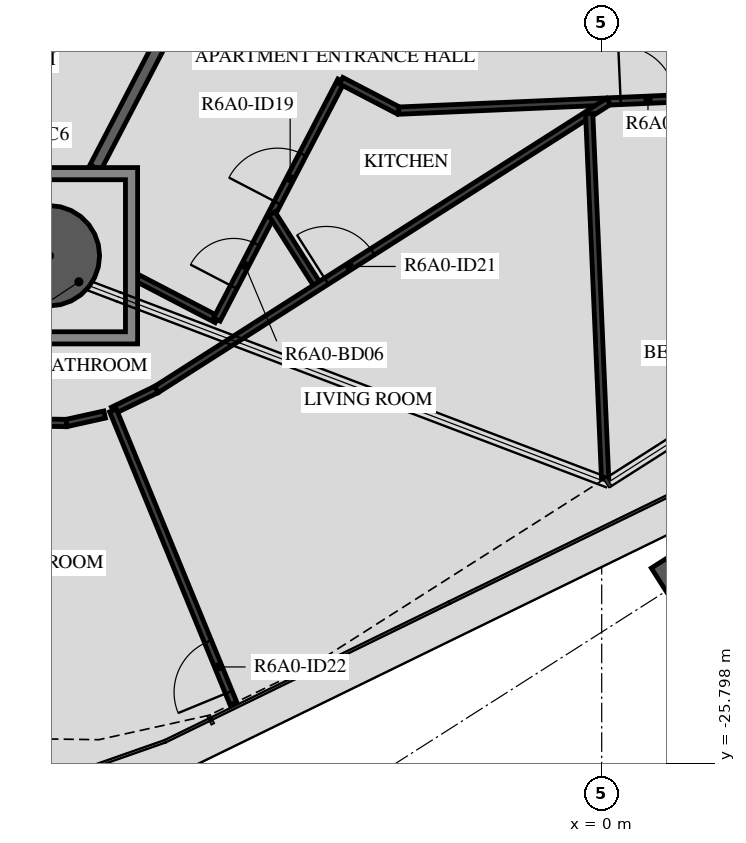
"""IFC4 building model, lengths in metres.
Left out: names, types, materials, properties, quantities, classifications, styles, units other than length and angle.
Written with IfcOpenShell. Run it as: python <this file> out.ifc"""

import sys

from ifc_helpers import new_model, si_unit, direction, frame, frame_2d, origin, origin_2d, place, context, subcontext, project, spatial, polyline, rectangle, hollow_circle, i_section, outline, extrude, element, fill, save


model = new_model("IFC4")
c1 = context("Model", 3, precision=1e-05, world=origin(), true_north=direction((0.0, 1.0)))
c2 = subcontext(c1, "Body", "Model", "MODEL_VIEW")
j1 = project(units=[si_unit("LENGTHUNIT", "METRE"), si_unit("PLANEANGLEUNIT", "RADIAN")], contexts=[c1])
p1 = place(None, origin())
s1 = spatial("IfcSite", under=j1, at=p1, CompositionType="ELEMENT")
p2 = place(p1, origin())
s2 = spatial("IfcBuilding", under=s1, at=p2, CompositionType="ELEMENT")
p3 = place(p2, frame((0.0, 0.0, 226.7)))
s3 = spatial("IfcBuildingStorey", under=s2, at=p3, CompositionType="ELEMENT", Elevation=226.7)
p4 = place(p3, frame((-9.082, -17.446, -0.45), z_axis=(0.0, 0.0, 1.0), x_axis=(1.0, 0.0, 0.0)))
e1 = element("IfcColumn", 1, at=p4, inside=s3, PredefinedType="COLUMN", context=c2, shape_type="SweptSolid", body=[
    extrude(hollow_circle(Radius=0.825, WallThickness=0.04, at=origin_2d()), origin(), (0.0, 0.0, 1.0), 3.57),
])
p5 = place(p3, frame((1.185, -22.881, -0.45), z_axis=(0.0, 0.0, 1.0), x_axis=(-0.843391139633, -0.537300088953, 0.0)))
e2 = element("IfcColumn", 2, at=p5, inside=s3, PredefinedType="COLUMN", context=c2, shape_type="SweptSolid", body=[
    extrude(i_section(OverallWidth=0.3, OverallDepth=0.9, WebThickness=0.019, FlangeThickness=0.035, FilletRadius=0.03, at=origin_2d()), origin(), (0.0, 0.0, 1.0), 3.57),
])
p6 = place(p3, frame((-8.326, -15.996, 0.0), z_axis=(0.0, 0.0, 1.0), x_axis=(0.461739255077, 0.887015704664, 0.0)))
e3 = element("IfcWall", 3, at=p6, inside=s3, PredefinedType="STANDARD", context=c2, shape_type="SweptSolid", body=[
    extrude(rectangle(XDim=4.633, YDim=0.2, at=frame_2d((2.317, 0.0))), origin(), (0.0, 0.0, 1.0), 3.12),
])
p7 = place(p3, frame((-7.632, -17.815, 0.0), z_axis=(0.0, 0.0, 1.0), x_axis=(0.886960889958, -0.461844540602, 0.0)))
e4 = element("IfcWall", 4, at=p7, inside=s3, PredefinedType="PARTITIONING", context=c2, shape_type="SweptSolid", body=[
    extrude(rectangle(XDim=1.469, YDim=0.12, at=frame_2d((0.734, 0.0))), origin(), (0.0, 0.0, 1.0), 3.12),
])
p8 = place(p3, frame((-6.329, -18.494, 0.0), z_axis=(0.0, 0.0, 1.0), x_axis=(0.461759058182, 0.887005395805, 0.0)))
e5 = element("IfcWall", 5, at=p8, inside=s3, PredefinedType="PARTITIONING", context=c2, shape_type="SweptSolid", body=[
    extrude(rectangle(XDim=4.427, YDim=0.12, at=frame_2d((2.213, 0.0))), origin(), (0.0, 0.0, 1.0), 3.12),
])
p9 = place(p8, frame((0.6, 0.0, 0.0)))
e6 = element("IfcOpeningElement", 6, at=p9, cuts=e5, PredefinedType="OPENING", context=c2, shape_type="SweptSolid", body=[
    extrude(rectangle(XDim=0.8, YDim=2.1, at=frame_2d((0.4, 1.05))), frame((0.0, 0.07, 0.0), z_axis=(0.0, -1.0, 0.0), x_axis=(1.0, 0.0, 0.0)), (0.0, 0.0, 1.0), 0.14),
])
p10 = place(p8, frame((2.161, 0.0, 0.0)))
e7 = element("IfcOpeningElement", 7, at=p10, cuts=e5, PredefinedType="OPENING", context=c2, shape_type="SweptSolid", body=[
    extrude(rectangle(XDim=0.9, YDim=2.1, at=frame_2d((0.45, 1.05))), frame((0.0, 0.07, 0.0), z_axis=(0.0, -1.0, 0.0), x_axis=(1.0, 0.0, 0.0)), (0.0, 0.0, 1.0), 0.14),
])
p11 = place(p3, frame((-4.285, -14.567, 0.0), z_axis=(0.0, 0.0, 1.0), x_axis=(0.887033177378, -0.46170568789, 0.0)))
e8 = element("IfcWall", 8, at=p11, inside=s3, PredefinedType="PARTITIONING", context=c2, shape_type="SweptSolid", body=[
    extrude(rectangle(XDim=1.067, YDim=0.12, at=frame_2d((0.534, 0.0))), origin(), (0.0, 0.0, 1.0), 3.12),
])
p12 = place(p3, frame((-3.339, -15.06, 0.0), z_axis=(0.0, 0.0, 1.0), x_axis=(0.999047716945, 0.043630943905, 0.0)))
e9 = element("IfcWall", 9, at=p12, inside=s3, PredefinedType="PARTITIONING", context=c2, shape_type="SweptSolid", body=[
    extrude(rectangle(XDim=7.985, YDim=0.12, at=frame_2d((3.992, 0.0))), origin(), (0.0, 0.0, 1.0), 3.12),
])
p13 = place(p12, frame((3.654, 0.0, 0.0)))
e10 = element("IfcOpeningElement", 10, at=p13, cuts=e9, PredefinedType="OPENING", context=c2, shape_type="SweptSolid", body=[
    extrude(rectangle(XDim=0.9, YDim=2.1, at=frame_2d((0.45, 1.05))), frame((0.0, 0.07, 0.0), z_axis=(0.0, -1.0, 0.0), x_axis=(1.0, 0.0, 0.0)), (0.0, 0.0, 1.0), 0.14),
])
for number, where, z_axis, x_axis in (
    (11, (-9.443, -20.187, 0.0), (0.0, 0.0, 1.0), (1.0, -0.014, 0.0)),
    (12, (-8.801, -20.197, 0.0), (0.0, 0.0, 1.0), (0.976, 0.216, 0.0)),
):
    element("IfcWall", number, at=place(p3, frame(where, z_axis=z_axis, x_axis=x_axis)), inside=s3, PredefinedType="PARTITIONING", context=c2, shape_type="SweptSolid", body=[
        extrude(rectangle(XDim=0.642, YDim=0.12, at=frame_2d((0.321, 0.0))), origin(), (0.0, 0.0, 1.0), 3.12),
    ])
p14 = place(p3, frame((-4.662, -17.95, 0.0), z_axis=(0.0, 0.0, 1.0), x_axis=(-0.537254271207, 0.843420327043, 0.0)))
e13 = element("IfcWall", 13, at=p14, inside=s3, PredefinedType="PARTITIONING", context=c2, shape_type="SweptSolid", body=[
    extrude(rectangle(XDim=1.418, YDim=0.12, at=frame_2d((0.709, 0.0))), origin(), (0.0, 0.0, 1.0), 3.12),
])
p15 = place(p3, frame((-8.037, -19.991, 0.0), z_axis=(0.0, 0.0, 1.0), x_axis=(0.900073671326, 0.435737749323, 0.0)))
e14 = element("IfcWall", 14, at=p15, inside=s3, PredefinedType="PARTITIONING", context=c2, shape_type="SweptSolid", body=[
    extrude(rectangle(XDim=0.794, YDim=0.12, at=frame_2d((0.397, 0.0))), origin(), (0.0, 0.0, 1.0), 3.12),
])
p16 = place(p3, frame((-7.322, -19.645, 0.0), z_axis=(0.0, 0.0, 1.0), x_axis=(0.843385361817, 0.537309158188, 0.0)))
e15 = element("IfcWall", 15, at=p16, inside=s3, PredefinedType="PARTITIONING", context=c2, shape_type="SweptSolid", body=[
    extrude(rectangle(XDim=8.814, YDim=0.12, at=frame_2d((4.407, 0.0))), origin(), (0.0, 0.0, 1.0), 3.12),
])
p17 = place(p16, frame((3.314, 0.0, 0.0)))
e16 = element("IfcOpeningElement", 16, at=p17, cuts=e15, PredefinedType="OPENING", context=c2, shape_type="SweptSolid", body=[
    extrude(rectangle(XDim=0.9, YDim=2.1, at=frame_2d((0.45, 1.05))), frame((0.0, 0.07, 0.0), z_axis=(0.0, -1.0, 0.0), x_axis=(1.0, 0.0, 0.0)), (0.0, 0.0, 1.0), 0.14),
])
p18 = place(p3, frame((-6.057, -24.81, 0.0), z_axis=(0.0, 0.0, 1.0), x_axis=(-0.380052033163, 0.924965108579, 0.0)))
e17 = element("IfcWall", 17, at=p18, inside=s3, PredefinedType="PARTITIONING", context=c2, shape_type="SweptSolid", body=[
    extrude(rectangle(XDim=5.21, YDim=0.12, at=frame_2d((2.605, 0.0))), origin(), (0.0, 0.0, 1.0), 3.12),
])
p19 = place(p18, frame((0.2, 0.0, 0.0)))
e18 = element("IfcOpeningElement", 18, at=p19, cuts=e17, PredefinedType="OPENING", context=c2, shape_type="SweptSolid", body=[
    extrude(rectangle(XDim=0.9, YDim=2.1, at=frame_2d((0.45, 1.05))), frame((0.0, 0.07, 0.0), z_axis=(0.0, -1.0, 0.0), x_axis=(1.0, 0.0, 0.0)), (0.0, 0.0, 1.0), 0.14),
])
p20 = place(p3, frame((0.056, -21.11, 0.0), z_axis=(0.0, 0.0, 1.0), x_axis=(-0.043629559022, 0.999047777426, 0.0)))
e19 = element("IfcWall", 19, at=p20, inside=s3, PredefinedType="PARTITIONING", context=c2, shape_type="SweptSolid", body=[
    extrude(rectangle(XDim=6.004, YDim=0.12, at=frame_2d((3.002, 0.0))), origin(), (0.0, 0.0, 1.0), 3.12),
])
p21 = place(p3, origin())
e20 = element("IfcWall", 20, at=p21, inside=s3, PredefinedType="STANDARD", context=c2, shape_type="SweptSolid", body=[
    extrude(outline(polyline([(-7.632, -15.996), (-7.632, -18.896), (-10.532, -18.896), (-10.532, -15.996), (-7.632, -15.996)]), holes=[polyline([(-10.332, -18.696), (-7.832, -18.696), (-7.832, -16.196), (-10.332, -16.196), (-10.332, -18.696)])]), origin(), (0.0, 0.0, 1.0), 3.12),
])
p22 = place(p9, origin())
e21 = element("IfcDoor", 21, at=p22, inside=s3, OperationType="SINGLE_SWING_LEFT", PredefinedType="DOOR", context=c2, shape_type="SweptSolid", body=[
    extrude(rectangle(XDim=0.8, YDim=2.1, at=frame_2d((0.4, 1.05))), frame((0.0, 0.025, 0.0), z_axis=(0.0, -1.0, 0.0), x_axis=(1.0, 0.0, 0.0)), (0.0, 0.0, 1.0), 0.05),
])
fill(e6, e21)
p23 = place(p10, origin())
e22 = element("IfcDoor", 22, at=p23, inside=s3, OperationType="SINGLE_SWING_LEFT", PredefinedType="DOOR", context=c2, shape_type="SweptSolid", body=[
    extrude(rectangle(XDim=0.9, YDim=2.1, at=frame_2d((0.45, 1.05))), frame((0.0, 0.025, 0.0), z_axis=(0.0, -1.0, 0.0), x_axis=(1.0, 0.0, 0.0)), (0.0, 0.0, 1.0), 0.05),
])
fill(e7, e22)
p24 = place(p13, origin())
e23 = element("IfcDoor", 23, at=p24, inside=s3, OperationType="SINGLE_SWING_LEFT", PredefinedType="DOOR", context=c2, shape_type="SweptSolid", body=[
    extrude(rectangle(XDim=0.9, YDim=2.1, at=frame_2d((0.45, 1.05))), frame((0.0, 0.025, 0.0), z_axis=(0.0, -1.0, 0.0), x_axis=(1.0, 0.0, 0.0)), (0.0, 0.0, 1.0), 0.05),
])
fill(e10, e23)
p25 = place(p17, origin())
e24 = element("IfcDoor", 24, at=p25, inside=s3, OperationType="SINGLE_SWING_LEFT", PredefinedType="DOOR", context=c2, shape_type="SweptSolid", body=[
    extrude(rectangle(XDim=0.9, YDim=2.1, at=frame_2d((0.45, 1.05))), frame((0.0, 0.025, 0.0), z_axis=(0.0, -1.0, 0.0), x_axis=(1.0, 0.0, 0.0)), (0.0, 0.0, 1.0), 0.05),
])
fill(e16, e24)
p26 = place(p19, origin())
e25 = element("IfcDoor", 25, at=p26, inside=s3, OperationType="SINGLE_SWING_LEFT", PredefinedType="DOOR", context=c2, shape_type="SweptSolid", body=[
    extrude(rectangle(XDim=0.9, YDim=2.1, at=frame_2d((0.45, 1.05))), frame((0.0, 0.025, 0.0), z_axis=(0.0, -1.0, 0.0), x_axis=(1.0, 0.0, 0.0)), (0.0, 0.0, 1.0), 0.05),
])
fill(e18, e25)
save(model, sys.argv[1])
